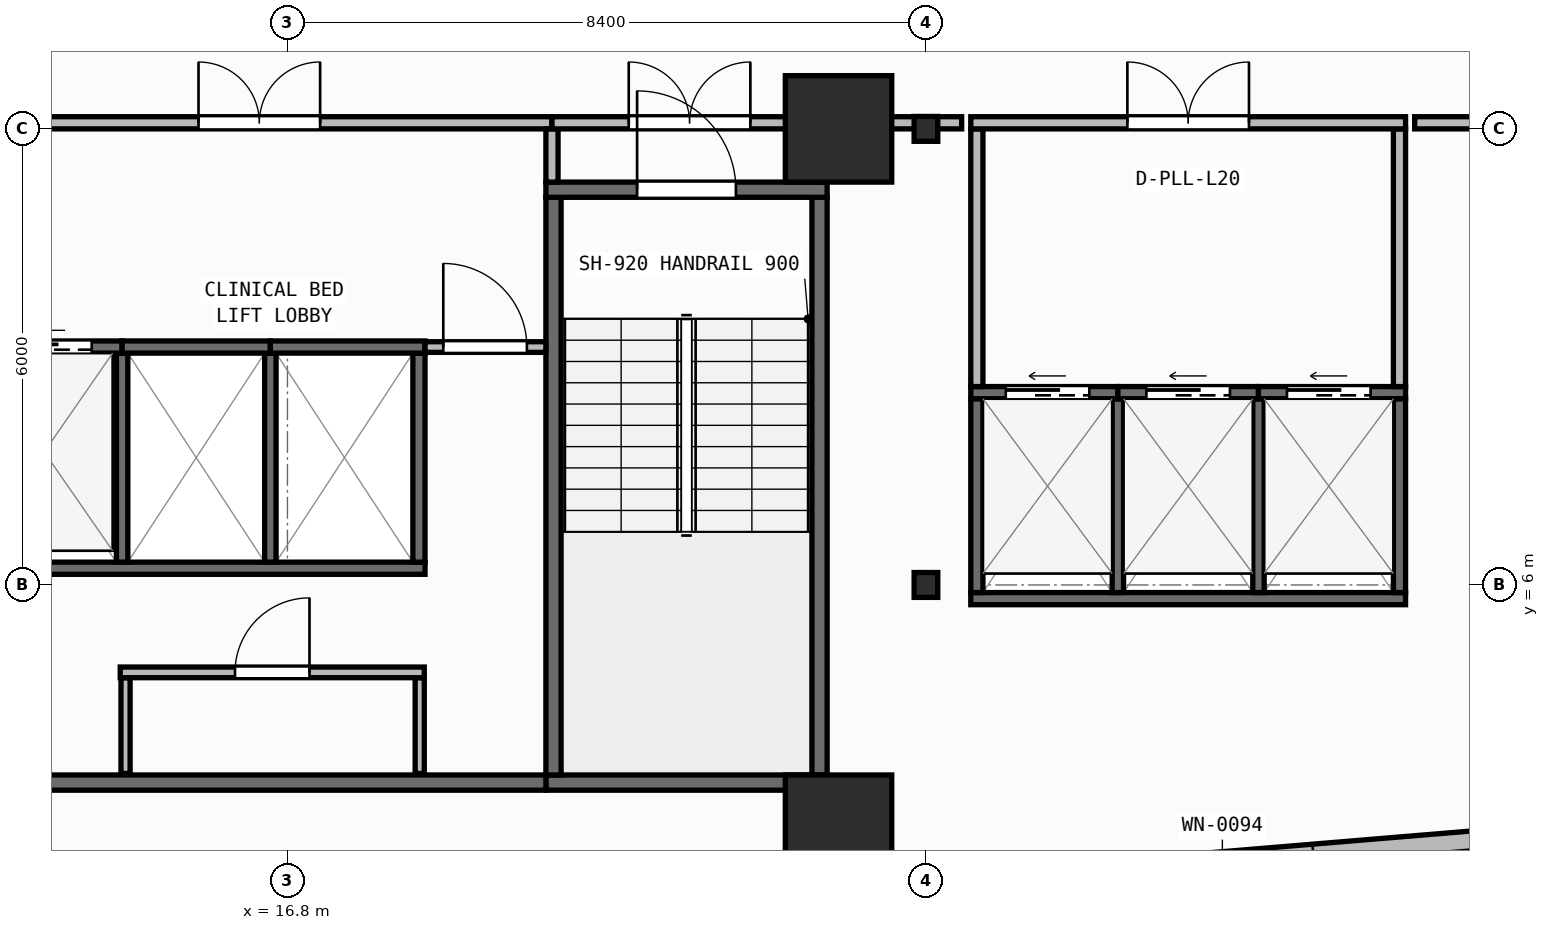
"""IFC4 building model, lengths in metres.
Left out: names, types, materials, properties, quantities, classifications, styles, units other than length and angle.
Written with IfcOpenShell. Run it as: python <this file> out.ifc"""

import sys

from ifc_helpers import new_model, si_unit, direction, frame, frame_2d, origin, origin_2d, place, context, subcontext, project, spatial, rectangle, i_section, extrude, element, fill, save


model = new_model("IFC4")
c1 = context("Model", 3, precision=1e-05, world=origin(), true_north=direction((0.0, 1.0)))
c2 = subcontext(c1, "Body", "Model", "MODEL_VIEW")
j1 = project(units=[si_unit("LENGTHUNIT", "METRE"), si_unit("PLANEANGLEUNIT", "RADIAN")], contexts=[c1])
p1 = place(None, origin())
s1 = spatial("IfcSite", under=j1, at=p1, CompositionType="ELEMENT")
p2 = place(p1, origin())
s2 = spatial("IfcBuilding", under=s1, at=p2, CompositionType="ELEMENT")
p3 = place(p2, frame((0.0, 0.0, 81.75)))
s3 = spatial("IfcBuildingStorey", under=s2, at=p3, CompositionType="ELEMENT", Elevation=81.75)
p4 = place(p3, frame((24.05, 2.8, 0.0), z_axis=(0.0, 0.0, 1.0), x_axis=(1.0, 0.0, 0.0)))
e1 = element("IfcColumn", 1, at=p4, inside=s3, PredefinedType="COLUMN", context=c2, shape_type="SweptSolid", body=[
    extrude(rectangle(XDim=1.4, YDim=1.4, at=origin_2d()), origin(), (0.0, 0.0, 1.0), 3.95),
])
p5 = place(p3, frame((25.2, 6.0, 0.0), z_axis=(0.0, 0.0, 1.0), x_axis=(1.0, 0.0, 0.0)))
e2 = element("IfcColumn", 2, at=p5, inside=s3, PredefinedType="COLUMN", context=c2, shape_type="SweptSolid", body=[
    extrude(i_section(OverallWidth=0.311, OverallDepth=0.327, WebThickness=0.016, FlangeThickness=0.025, FilletRadius=0.017, at=origin_2d()), origin(), (0.0, 0.0, 1.0), 3.95),
])
p6 = place(p3, frame((24.05, 12.0, 0.0), z_axis=(0.0, 0.0, 1.0), x_axis=(1.0, 0.0, 0.0)))
e3 = element("IfcColumn", 3, at=p6, inside=s3, PredefinedType="COLUMN", context=c2, shape_type="SweptSolid", body=[
    extrude(rectangle(XDim=1.4, YDim=1.4, at=origin_2d()), origin(), (0.0, 0.0, 1.0), 3.95),
])
p7 = place(p3, frame((25.2, 12.0, 0.0), z_axis=(0.0, 0.0, 1.0), x_axis=(1.0, 0.0, 0.0)))
e4 = element("IfcColumn", 4, at=p7, inside=s3, PredefinedType="COLUMN", context=c2, shape_type="SweptSolid", body=[
    extrude(i_section(OverallWidth=0.311, OverallDepth=0.327, WebThickness=0.016, FlangeThickness=0.025, FilletRadius=0.017, at=origin_2d()), origin(), (0.0, 0.0, 1.0), 3.95),
])
p8 = place(p3, frame((2.76, 0.174, 0.0), z_axis=(0.0, 0.0, 1.0), x_axis=(0.996571478456, 0.082736257641, 0.0)))
e5 = element("IfcWall", 5, at=p8, inside=s3, PredefinedType="STANDARD", context=c2, shape_type="SweptSolid", body=[
    extrude(rectangle(XDim=52.861, YDim=0.26, at=frame_2d((26.431, 0.0))), origin(), (0.0, 0.0, 1.0), 3.71),
])
p9 = place(p8, frame((25.231, 0.0, 0.9)))
e6 = element("IfcOpeningElement", 6, at=p9, cuts=e5, PredefinedType="OPENING", context=c2, shape_type="SweptSolid", body=[
    extrude(rectangle(XDim=2.4, YDim=1.65, at=frame_2d((1.2, 0.825))), frame((0.0, 0.14, 0.0), z_axis=(0.0, -1.0, 0.0), x_axis=(1.0, 0.0, 0.0)), (0.0, 0.0, 1.0), 0.28),
])
p10 = place(p3, frame((20.2, 3.4, 0.0), z_axis=(0.0, 0.0, 1.0), x_axis=(1.0, 0.0, 0.0)))
e7 = element("IfcWall", 7, at=p10, inside=s3, PredefinedType="SHEAR", context=c2, shape_type="SweptSolid", body=[
    extrude(rectangle(XDim=3.7, YDim=0.2, at=frame_2d((1.85, 0.0))), origin(), (0.0, 0.0, 1.0), 3.71),
])
for number, where, z_axis, x_axis in (
    (8, (20.3, 3.5, 0.0), (0.0, 0.0, 1.0), (0.0, 1.0, 0.0)),
    (9, (23.8, 3.5, 0.0), (0.0, 0.0, 1.0), (0.0, 1.0, 0.0)),
):
    element("IfcWall", number, at=place(p3, frame(where, z_axis=z_axis, x_axis=x_axis)), inside=s3, PredefinedType="SHEAR", context=c2, shape_type="SweptSolid", body=[
        extrude(rectangle(XDim=7.6, YDim=0.2, at=frame_2d((3.8, 0.0))), origin(), (0.0, 0.0, 1.0), 3.71),
    ])
p11 = place(p3, frame((20.2, 11.2, 0.0), z_axis=(0.0, 0.0, 1.0), x_axis=(1.0, 0.0, 0.0)))
e10 = element("IfcWall", 10, at=p11, inside=s3, PredefinedType="SHEAR", context=c2, shape_type="SweptSolid", body=[
    extrude(rectangle(XDim=3.7, YDim=0.2, at=frame_2d((1.85, 0.0))), origin(), (0.0, 0.0, 1.0), 3.71),
])
p12 = place(p11, frame((1.2, 0.0, 0.0)))
e11 = element("IfcOpeningElement", 11, at=p12, cuts=e10, PredefinedType="OPENING", context=c2, shape_type="SweptSolid", body=[
    extrude(rectangle(XDim=1.3, YDim=2.15, at=frame_2d((0.65, 1.075))), frame((0.0, 0.11, 0.0), z_axis=(0.0, -1.0, 0.0), x_axis=(1.0, 0.0, 0.0)), (0.0, 0.0, 1.0), 0.22),
])
p13 = place(p3, frame((6.5, 3.4, 0.0), z_axis=(0.0, 0.0, 1.0), x_axis=(1.0, 0.0, 0.0)))
e12 = element("IfcWall", 12, at=p13, inside=s3, PredefinedType="SHEAR", context=c2, shape_type="SweptSolid", body=[
    extrude(rectangle(XDim=13.7, YDim=0.2, at=frame_2d((6.85, 0.0))), origin(), (0.0, 0.0, 1.0), 3.71),
])
p14 = place(p3, frame((6.5, 6.22, 0.0), z_axis=(0.0, 0.0, 1.0), x_axis=(1.0, 0.0, 0.0)))
e13 = element("IfcWall", 13, at=p14, inside=s3, PredefinedType="SHEAR", context=c2, shape_type="SweptSolid", body=[
    extrude(rectangle(XDim=12.11, YDim=0.16, at=frame_2d((6.055, 0.0))), origin(), (0.0, 0.0, 1.0), 3.71),
])
p15 = place(p3, frame((18.53, 6.3, 0.0), z_axis=(0.0, 0.0, 1.0), x_axis=(0.0, 1.0, 0.0)))
e14 = element("IfcWall", 14, at=p15, inside=s3, PredefinedType="SHEAR", context=c2, shape_type="SweptSolid", body=[
    extrude(rectangle(XDim=2.75, YDim=0.16, at=frame_2d((1.375, 0.0))), origin(), (0.0, 0.0, 1.0), 3.71),
])
for number, where, z_axis, x_axis in (
    (15, (14.625, 6.3, 0.0), (0.0, 0.0, 1.0), (0.0, 1.0, 0.0)),
    (16, (16.575, 6.3, 0.0), (0.0, 0.0, 1.0), (0.0, 1.0, 0.0)),
):
    element("IfcWall", number, at=place(p3, frame(where, z_axis=z_axis, x_axis=x_axis)), inside=s3, PredefinedType="SHEAR", context=c2, shape_type="SweptSolid", body=[
        extrude(rectangle(XDim=2.75, YDim=0.15, at=frame_2d((1.375, 0.0))), origin(), (0.0, 0.0, 1.0), 3.71),
    ])
p16 = place(p3, frame((12.575, 9.13, 0.0), z_axis=(0.0, 0.0, 1.0), x_axis=(1.0, 0.0, 0.0)))
e17 = element("IfcWall", 17, at=p16, inside=s3, PredefinedType="SHEAR", context=c2, shape_type="SweptSolid", body=[
    extrude(rectangle(XDim=2.05, YDim=0.16, at=frame_2d((1.025, 0.0))), origin(), (0.0, 0.0, 1.0), 3.71),
])
p17 = place(p16, frame((0.4, 0.0, 0.0)))
e18 = element("IfcOpeningElement", 18, at=p17, cuts=e17, PredefinedType="OPENING", context=c2, shape_type="SweptSolid", body=[
    extrude(rectangle(XDim=1.25, YDim=2.15, at=frame_2d((0.625, 1.075))), frame((0.0, 0.09, 0.0), z_axis=(0.0, -1.0, 0.0), x_axis=(1.0, 0.0, 0.0)), (0.0, 0.0, 1.0), 0.18),
])
p18 = place(p3, frame((14.625, 9.13, 0.0), z_axis=(0.0, 0.0, 1.0), x_axis=(1.0, 0.0, 0.0)))
e19 = element("IfcWall", 19, at=p18, inside=s3, PredefinedType="SHEAR", context=c2, shape_type="SweptSolid", body=[
    extrude(rectangle(XDim=1.95, YDim=0.16, at=frame_2d((0.975, 0.0))), origin(), (0.0, 0.0, 1.0), 3.71),
])
p19 = place(p3, frame((16.575, 9.13, 0.0), z_axis=(0.0, 0.0, 1.0), x_axis=(1.0, 0.0, 0.0)))
e20 = element("IfcWall", 20, at=p19, inside=s3, PredefinedType="SHEAR", context=c2, shape_type="SweptSolid", body=[
    extrude(rectangle(XDim=2.035, YDim=0.16, at=frame_2d((1.018, 0.0))), origin(), (0.0, 0.0, 1.0), 3.71),
])
p20 = place(p3, frame((25.79, 5.82, 0.0), z_axis=(0.0, 0.0, 1.0), x_axis=(1.0, 0.0, 0.0)))
e21 = element("IfcWall", 21, at=p20, inside=s3, PredefinedType="SHEAR", context=c2, shape_type="SweptSolid", body=[
    extrude(rectangle(XDim=5.72, YDim=0.16, at=frame_2d((2.86, 0.0))), origin(), (0.0, 0.0, 1.0), 3.71),
])
for number, where, z_axis, x_axis in (
    (22, (25.87, 5.9, 0.0), (0.0, 0.0, 1.0), (0.0, 1.0, 0.0)),
    (23, (31.43, 5.9, 0.0), (0.0, 0.0, 1.0), (0.0, 1.0, 0.0)),
):
    element("IfcWall", number, at=place(p3, frame(where, z_axis=z_axis, x_axis=x_axis)), inside=s3, PredefinedType="SHEAR", context=c2, shape_type="SweptSolid", body=[
        extrude(rectangle(XDim=2.55, YDim=0.16, at=frame_2d((1.275, 0.0))), origin(), (0.0, 0.0, 1.0), 3.71),
    ])
for number, where, z_axis, x_axis in (
    (24, (27.725, 5.9, 0.0), (0.0, 0.0, 1.0), (0.0, 1.0, 0.0)),
    (25, (29.575, 5.9, 0.0), (0.0, 0.0, 1.0), (0.0, 1.0, 0.0)),
):
    element("IfcWall", number, at=place(p3, frame(where, z_axis=z_axis, x_axis=x_axis)), inside=s3, PredefinedType="SHEAR", context=c2, shape_type="SweptSolid", body=[
        extrude(rectangle(XDim=2.55, YDim=0.15, at=frame_2d((1.275, 0.0))), origin(), (0.0, 0.0, 1.0), 3.71),
    ])
p21 = place(p3, frame((25.79, 8.53, 0.0), z_axis=(0.0, 0.0, 1.0), x_axis=(1.0, 0.0, 0.0)))
e26 = element("IfcWall", 26, at=p21, inside=s3, PredefinedType="SHEAR", context=c2, shape_type="SweptSolid", body=[
    extrude(rectangle(XDim=1.935, YDim=0.16, at=frame_2d((0.968, 0.0))), origin(), (0.0, 0.0, 1.0), 3.71),
])
p22 = place(p21, frame((0.46, 0.0, 0.0)))
e27 = element("IfcOpeningElement", 27, at=p22, cuts=e26, PredefinedType="OPENING", context=c2, shape_type="SweptSolid", body=[
    extrude(rectangle(XDim=1.1, YDim=2.15, at=frame_2d((0.55, 1.075))), frame((0.0, 0.09, 0.0), z_axis=(0.0, -1.0, 0.0), x_axis=(1.0, 0.0, 0.0)), (0.0, 0.0, 1.0), 0.18),
])
p23 = place(p3, frame((27.725, 8.53, 0.0), z_axis=(0.0, 0.0, 1.0), x_axis=(1.0, 0.0, 0.0)))
e28 = element("IfcWall", 28, at=p23, inside=s3, PredefinedType="SHEAR", context=c2, shape_type="SweptSolid", body=[
    extrude(rectangle(XDim=1.85, YDim=0.16, at=frame_2d((0.925, 0.0))), origin(), (0.0, 0.0, 1.0), 3.71),
])
p24 = place(p23, frame((0.375, 0.0, 0.0)))
e29 = element("IfcOpeningElement", 29, at=p24, cuts=e28, PredefinedType="OPENING", context=c2, shape_type="SweptSolid", body=[
    extrude(rectangle(XDim=1.1, YDim=2.15, at=frame_2d((0.55, 1.075))), frame((0.0, 0.09, 0.0), z_axis=(0.0, -1.0, 0.0), x_axis=(1.0, 0.0, 0.0)), (0.0, 0.0, 1.0), 0.18),
])
p25 = place(p3, frame((29.575, 8.53, 0.0), z_axis=(0.0, 0.0, 1.0), x_axis=(1.0, 0.0, 0.0)))
e30 = element("IfcWall", 30, at=p25, inside=s3, PredefinedType="SHEAR", context=c2, shape_type="SweptSolid", body=[
    extrude(rectangle(XDim=1.935, YDim=0.16, at=frame_2d((0.968, 0.0))), origin(), (0.0, 0.0, 1.0), 3.71),
])
p26 = place(p25, frame((0.375, 0.0, 0.0)))
e31 = element("IfcOpeningElement", 31, at=p26, cuts=e30, PredefinedType="OPENING", context=c2, shape_type="SweptSolid", body=[
    extrude(rectangle(XDim=1.1, YDim=2.15, at=frame_2d((0.55, 1.075))), frame((0.0, 0.09, 0.0), z_axis=(0.0, -1.0, 0.0), x_axis=(1.0, 0.0, 0.0)), (0.0, 0.0, 1.0), 0.18),
])
for number, where, z_axis, x_axis in (
    (32, (14.67, 3.52, 0.0), (0.0, 0.0, 1.0), (0.0, 1.0, 0.0)),
    (33, (18.54, 3.52, 0.0), (0.0, 0.0, 1.0), (0.0, 1.0, 0.0)),
):
    element("IfcWall", number, at=place(p3, frame(where, z_axis=z_axis, x_axis=x_axis)), inside=s3, PredefinedType="PARTITIONING", context=c2, shape_type="SweptSolid", body=[
        extrude(rectangle(XDim=1.26, YDim=0.12, at=frame_2d((0.63, 0.0))), origin(), (0.0, 0.0, 1.0), 3.71),
    ])
p27 = place(p3, frame((14.6, 4.85, 0.0), z_axis=(0.0, 0.0, 1.0), x_axis=(1.0, 0.0, 0.0)))
e34 = element("IfcWall", 34, at=p27, inside=s3, PredefinedType="PARTITIONING", context=c2, shape_type="SweptSolid", body=[
    extrude(rectangle(XDim=4.0, YDim=0.14, at=frame_2d((2.0, 0.0))), origin(), (0.0, 0.0, 1.0), 3.71),
])
p28 = place(p27, frame((1.51, 0.0, 0.0)))
e35 = element("IfcOpeningElement", 35, at=p28, cuts=e34, PredefinedType="OPENING", context=c2, shape_type="SweptSolid", body=[
    extrude(rectangle(XDim=0.98, YDim=2.1, at=frame_2d((0.49, 1.05))), frame((0.0, 0.08, 0.0), z_axis=(0.0, -1.0, 0.0), x_axis=(1.0, 0.0, 0.0)), (0.0, 0.0, 1.0), 0.16),
])
p29 = place(p3, frame((18.61, 9.13, 0.0), z_axis=(0.0, 0.0, 1.0), x_axis=(1.0, 0.0, 0.0)))
e36 = element("IfcWall", 36, at=p29, inside=s3, PredefinedType="PARTITIONING", context=c2, shape_type="SweptSolid", body=[
    extrude(rectangle(XDim=1.59, YDim=0.14, at=frame_2d((0.795, 0.0))), origin(), (0.0, 0.0, 1.0), 3.71),
])
p30 = place(p29, frame((0.24, 0.0, 0.0)))
e37 = element("IfcOpeningElement", 37, at=p30, cuts=e36, PredefinedType="OPENING", context=c2, shape_type="SweptSolid", body=[
    extrude(rectangle(XDim=1.1, YDim=2.1, at=frame_2d((0.55, 1.05))), frame((0.0, 0.08, 0.0), z_axis=(0.0, -1.0, 0.0), x_axis=(1.0, 0.0, 0.0)), (0.0, 0.0, 1.0), 0.16),
])
p31 = place(p3, frame((12.58, 12.08, 0.0), z_axis=(0.0, 0.0, 1.0), x_axis=(1.0, 0.0, 0.0)))
e38 = element("IfcWall", 38, at=p31, inside=s3, PredefinedType="PARTITIONING", context=c2, shape_type="SweptSolid", body=[
    extrude(rectangle(XDim=7.7, YDim=0.16, at=frame_2d((3.85, 0.0))), origin(), (0.0, 0.0, 1.0), 3.073),
])
p32 = place(p31, frame((3.05, 0.0, 0.0)))
e39 = element("IfcOpeningElement", 39, at=p32, cuts=e38, PredefinedType="OPENING", context=c2, shape_type="SweptSolid", body=[
    extrude(rectangle(XDim=1.6, YDim=2.05, at=frame_2d((0.8, 1.025))), frame((0.0, 0.09, 0.0), z_axis=(0.0, -1.0, 0.0), x_axis=(1.0, 0.0, 0.0)), (0.0, 0.0, 1.0), 0.18),
])
p33 = place(p3, frame((20.28, 11.3, 0.0), z_axis=(0.0, 0.0, 1.0), x_axis=(0.0, 1.0, 0.0)))
e40 = element("IfcWall", 40, at=p33, inside=s3, PredefinedType="PARTITIONING", context=c2, shape_type="SweptSolid", body=[
    extrude(rectangle(XDim=0.7, YDim=0.16, at=frame_2d((0.35, 0.0))), origin(), (0.0, 0.0, 1.0), 3.71),
])
p34 = place(p3, frame((20.28, 12.08, 0.0), z_axis=(0.0, 0.0, 1.0), x_axis=(1.0, 0.0, 0.0)))
e41 = element("IfcWall", 41, at=p34, inside=s3, PredefinedType="PARTITIONING", context=c2, shape_type="SweptSolid", body=[
    extrude(rectangle(XDim=3.62, YDim=0.16, at=frame_2d((1.81, 0.0))), origin(), (0.0, 0.0, 1.0), 3.073),
])
p35 = place(p34, frame((1.01, 0.0, 0.0)))
e42 = element("IfcOpeningElement", 42, at=p35, cuts=e41, PredefinedType="OPENING", context=c2, shape_type="SweptSolid", body=[
    extrude(rectangle(XDim=1.6, YDim=2.05, at=frame_2d((0.8, 1.025))), frame((0.0, 0.09, 0.0), z_axis=(0.0, -1.0, 0.0), x_axis=(1.0, 0.0, 0.0)), (0.0, 0.0, 1.0), 0.18),
])
p36 = place(p3, frame((23.82, 11.3, 0.0), z_axis=(0.0, 0.0, 1.0), x_axis=(0.0, 1.0, 0.0)))
e43 = element("IfcWall", 43, at=p36, inside=s3, PredefinedType="PARTITIONING", context=c2, shape_type="SweptSolid", body=[
    extrude(rectangle(XDim=0.7, YDim=0.16, at=frame_2d((0.35, 0.0))), origin(), (0.0, 0.0, 1.0), 3.71),
])
for number, where, z_axis, x_axis in (
    (44, (25.87, 8.61, 0.0), (0.0, 0.0, 1.0), (0.0, 1.0, 0.0)),
    (45, (31.43, 8.61, 0.0), (0.0, 0.0, 1.0), (0.0, 1.0, 0.0)),
):
    element("IfcWall", number, at=place(p3, frame(where, z_axis=z_axis, x_axis=x_axis)), inside=s3, PredefinedType="PARTITIONING", context=c2, shape_type="SweptSolid", body=[
        extrude(rectangle(XDim=3.39, YDim=0.16, at=frame_2d((1.695, 0.0))), origin(), (0.0, 0.0, 1.0), 3.71),
    ])
p37 = place(p3, frame((25.79, 12.08, 0.0), z_axis=(0.0, 0.0, 1.0), x_axis=(1.0, 0.0, 0.0)))
e46 = element("IfcWall", 46, at=p37, inside=s3, PredefinedType="PARTITIONING", context=c2, shape_type="SweptSolid", body=[
    extrude(rectangle(XDim=5.72, YDim=0.16, at=frame_2d((2.86, 0.0))), origin(), (0.0, 0.0, 1.0), 3.073),
])
p38 = place(p37, frame((2.06, 0.0, 0.0)))
e47 = element("IfcOpeningElement", 47, at=p38, cuts=e46, PredefinedType="OPENING", context=c2, shape_type="SweptSolid", body=[
    extrude(rectangle(XDim=1.6, YDim=2.05, at=frame_2d((0.8, 1.025))), frame((0.0, 0.09, 0.0), z_axis=(0.0, -1.0, 0.0), x_axis=(1.0, 0.0, 0.0)), (0.0, 0.0, 1.0), 0.18),
])
p39 = place(p3, frame((24.02, 12.08, 0.0), z_axis=(0.0, 0.0, 1.0), x_axis=(1.0, 0.0, 0.0)))
e48 = element("IfcWall", 48, at=p39, inside=s3, PredefinedType="PARTITIONING", context=c2, shape_type="SweptSolid", body=[
    extrude(rectangle(XDim=1.65, YDim=0.16, at=frame_2d((0.825, 0.0))), origin(), (0.0, 0.0, 1.0), 3.073),
])
p40 = place(p3, frame((31.63, 12.08, 0.0), z_axis=(0.0, 0.0, 1.0), x_axis=(1.0, 0.0, 0.0)))
e49 = element("IfcWall", 49, at=p40, inside=s3, PredefinedType="PARTITIONING", context=c2, shape_type="SweptSolid", body=[
    extrude(rectangle(XDim=11.181, YDim=0.16, at=frame_2d((5.59, 0.0))), origin(), (0.0, 0.0, 1.0), 3.073),
])
p41 = place(p12, origin())
e50 = element("IfcDoor", 50, at=p41, inside=s3, OperationType="SINGLE_SWING_LEFT", PredefinedType="DOOR", context=c2, shape_type="SweptSolid", body=[
    extrude(rectangle(XDim=1.3, YDim=2.15, at=frame_2d((0.65, 1.075))), frame((0.0, 0.025, 0.0), z_axis=(0.0, -1.0, 0.0), x_axis=(1.0, 0.0, 0.0)), (0.0, 0.0, 1.0), 0.05),
])
fill(e11, e50)
p42 = place(p17, origin())
e51 = element("IfcDoor", 51, at=p42, inside=s3, OperationType="SLIDING_TO_LEFT", PredefinedType="DOOR", context=c2, shape_type="SweptSolid", body=[
    extrude(rectangle(XDim=1.25, YDim=2.15, at=frame_2d((0.625, 1.075))), frame((0.0, 0.025, 0.0), z_axis=(0.0, -1.0, 0.0), x_axis=(1.0, 0.0, 0.0)), (0.0, 0.0, 1.0), 0.05),
])
fill(e18, e51)
p43 = place(p22, origin())
e52 = element("IfcDoor", 52, at=p43, inside=s3, OperationType="SLIDING_TO_LEFT", PredefinedType="DOOR", context=c2, shape_type="SweptSolid", body=[
    extrude(rectangle(XDim=1.1, YDim=2.15, at=frame_2d((0.55, 1.075))), frame((0.0, 0.025, 0.0), z_axis=(0.0, -1.0, 0.0), x_axis=(1.0, 0.0, 0.0)), (0.0, 0.0, 1.0), 0.05),
])
fill(e27, e52)
p44 = place(p24, origin())
e53 = element("IfcDoor", 53, at=p44, inside=s3, OperationType="SLIDING_TO_LEFT", PredefinedType="DOOR", context=c2, shape_type="SweptSolid", body=[
    extrude(rectangle(XDim=1.1, YDim=2.15, at=frame_2d((0.55, 1.075))), frame((0.0, 0.025, 0.0), z_axis=(0.0, -1.0, 0.0), x_axis=(1.0, 0.0, 0.0)), (0.0, 0.0, 1.0), 0.05),
])
fill(e29, e53)
p45 = place(p26, origin())
e54 = element("IfcDoor", 54, at=p45, inside=s3, OperationType="SLIDING_TO_LEFT", PredefinedType="DOOR", context=c2, shape_type="SweptSolid", body=[
    extrude(rectangle(XDim=1.1, YDim=2.15, at=frame_2d((0.55, 1.075))), frame((0.0, 0.025, 0.0), z_axis=(0.0, -1.0, 0.0), x_axis=(1.0, 0.0, 0.0)), (0.0, 0.0, 1.0), 0.05),
])
fill(e31, e54)
p46 = place(p28, origin())
e55 = element("IfcDoor", 55, at=p46, inside=s3, OperationType="SINGLE_SWING_RIGHT", PredefinedType="DOOR", context=c2, shape_type="SweptSolid", body=[
    extrude(rectangle(XDim=0.98, YDim=2.1, at=frame_2d((0.49, 1.05))), frame((0.0, 0.025, 0.0), z_axis=(0.0, -1.0, 0.0), x_axis=(1.0, 0.0, 0.0)), (0.0, 0.0, 1.0), 0.05),
])
fill(e35, e55)
p47 = place(p30, origin())
e56 = element("IfcDoor", 56, at=p47, inside=s3, OperationType="SINGLE_SWING_LEFT", PredefinedType="DOOR", context=c2, shape_type="SweptSolid", body=[
    extrude(rectangle(XDim=1.1, YDim=2.1, at=frame_2d((0.55, 1.05))), frame((0.0, 0.025, 0.0), z_axis=(0.0, -1.0, 0.0), x_axis=(1.0, 0.0, 0.0)), (0.0, 0.0, 1.0), 0.05),
])
fill(e37, e56)
p48 = place(p32, origin())
e57 = element("IfcDoor", 57, at=p48, inside=s3, OperationType="DOUBLE_DOOR_SINGLE_SWING", PredefinedType="DOOR", context=c2, shape_type="SweptSolid", body=[
    extrude(rectangle(XDim=1.6, YDim=2.05, at=frame_2d((0.8, 1.025))), frame((0.0, 0.025, 0.0), z_axis=(0.0, -1.0, 0.0), x_axis=(1.0, 0.0, 0.0)), (0.0, 0.0, 1.0), 0.05),
])
fill(e39, e57)
p49 = place(p35, origin())
e58 = element("IfcDoor", 58, at=p49, inside=s3, OperationType="DOUBLE_DOOR_SINGLE_SWING", PredefinedType="DOOR", context=c2, shape_type="SweptSolid", body=[
    extrude(rectangle(XDim=1.6, YDim=2.05, at=frame_2d((0.8, 1.025))), frame((0.0, 0.025, 0.0), z_axis=(0.0, -1.0, 0.0), x_axis=(1.0, 0.0, 0.0)), (0.0, 0.0, 1.0), 0.05),
])
fill(e42, e58)
p50 = place(p38, origin())
e59 = element("IfcDoor", 59, at=p50, inside=s3, OperationType="DOUBLE_DOOR_SINGLE_SWING", PredefinedType="DOOR", context=c2, shape_type="SweptSolid", body=[
    extrude(rectangle(XDim=1.6, YDim=2.05, at=frame_2d((0.8, 1.025))), frame((0.0, 0.025, 0.0), z_axis=(0.0, -1.0, 0.0), x_axis=(1.0, 0.0, 0.0)), (0.0, 0.0, 1.0), 0.05),
])
fill(e47, e59)
save(model, sys.argv[1])
